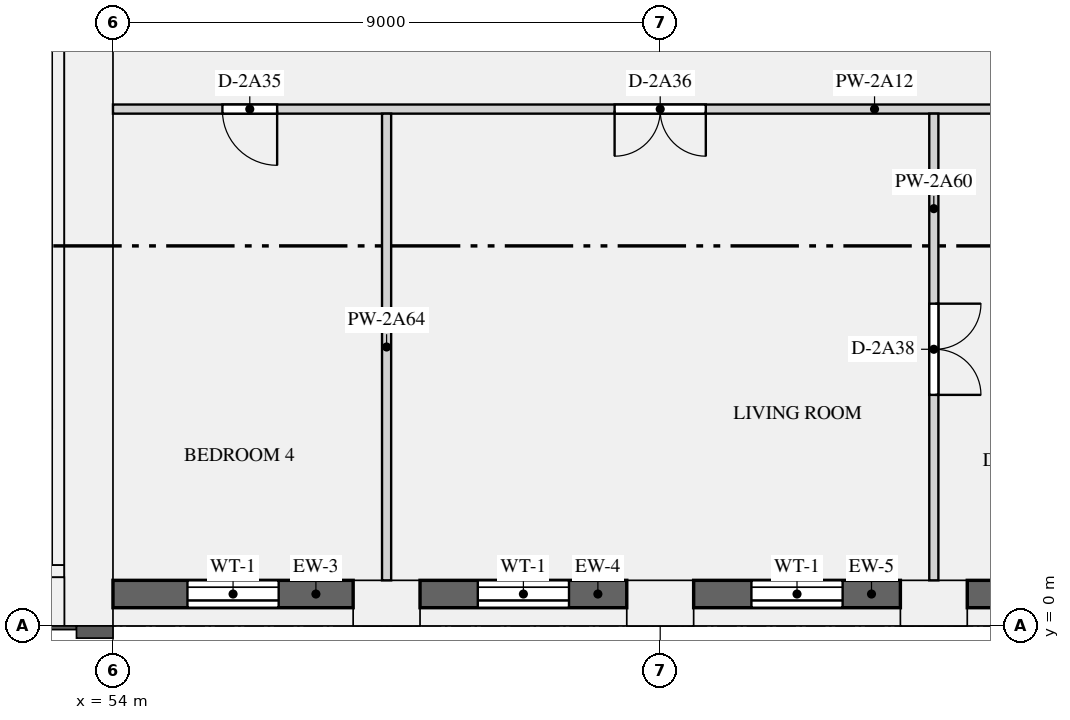
"""IFC4 building model, lengths in metres.
Left out: names, types, materials, properties, quantities, classifications, styles, units other than length and angle.
Written with IfcOpenShell. Run it as: python <this file> out.ifc"""

import sys

from ifc_helpers import new_model, si_unit, direction, frame, frame_2d, origin, origin_2d, place, context, subcontext, project, spatial, rectangle, extrude, element, fill, save


model = new_model("IFC4")
c1 = context("Model", 3, precision=1e-05, world=origin(), true_north=direction((0.0, 1.0)))
c2 = subcontext(c1, "Body", "Model", "MODEL_VIEW")
j1 = project(units=[si_unit("LENGTHUNIT", "METRE"), si_unit("PLANEANGLEUNIT", "RADIAN")], contexts=[c1])
p1 = place(None, origin())
s1 = spatial("IfcSite", under=j1, at=p1, CompositionType="ELEMENT")
p2 = place(p1, origin())
s2 = spatial("IfcBuilding", under=s1, at=p2, CompositionType="ELEMENT")
p3 = place(p2, frame((0.0, 0.0, 83.55)))
s3 = spatial("IfcBuildingStorey", under=s2, at=p3, CompositionType="ELEMENT", Elevation=83.55)
for number, where, z_axis, x_axis in (
    (1, (58.5, 0.375, 0.0), (0.0, 0.0, 1.0), (1.0, 0.0, 0.0)),
    (2, (63.0, 0.375, 0.0), (0.0, 0.0, 1.0), (1.0, 0.0, 0.0)),
    (3, (67.5, 0.375, 0.0), (0.0, 0.0, 1.0), (1.0, 0.0, 0.0)),
):
    element("IfcColumn", number, at=place(p3, frame(where, z_axis=z_axis, x_axis=x_axis)), inside=s3, PredefinedType="USERDEFINED", context=c2, shape_type="SweptSolid", body=[
        extrude(rectangle(XDim=1.1, YDim=0.75, at=origin_2d()), origin(), (0.0, 0.0, 1.0), 3.15),
    ])
p4 = place(p3, frame((53.6, 0.0, 0.0), z_axis=(0.0, 0.0, 1.0), x_axis=(0.0, 1.0, 0.0)))
e4 = element("IfcWall", 4, at=p4, inside=s3, PredefinedType="SHEAR", context=c2, shape_type="SweptSolid", body=[
    extrude(rectangle(XDim=12.5, YDim=0.8, at=frame_2d((6.25, 0.0))), origin(), (0.0, 0.0, 1.0), 3.15),
])
p5 = place(p3, frame((18.8, 0.4, 0.0), z_axis=(0.0, 0.0, 1.0), x_axis=(1.0, 0.0, 0.0)))
e5 = element("IfcWall", 5, at=p5, inside=s3, PredefinedType="SHEAR", context=c2, shape_type="SweptSolid", body=[
    extrude(rectangle(XDim=34.4, YDim=0.8, at=frame_2d((17.2, 0.0))), origin(), (0.0, 0.0, 1.0), 3.15),
])
p6 = place(p3, frame((53.1, 1.0, 0.0), z_axis=(0.0, 0.0, 1.0), x_axis=(0.0, 1.0, 0.0)))
e6 = element("IfcWall", 6, at=p6, inside=s3, PredefinedType="SHEAR", context=c2, shape_type="SweptSolid", body=[
    extrude(rectangle(XDim=10.9, YDim=0.2, at=frame_2d((5.45, 0.0))), origin(), (0.0, 0.0, 1.0), 3.15),
])
p7 = place(p3, frame((18.8, 0.9, 0.0), z_axis=(0.0, 0.0, 1.0), x_axis=(1.0, 0.0, 0.0)))
e7 = element("IfcWall", 7, at=p7, inside=s3, PredefinedType="SHEAR", context=c2, shape_type="SweptSolid", body=[
    extrude(rectangle(XDim=34.4, YDim=0.2, at=frame_2d((17.2, 0.0))), origin(), (0.0, 0.0, 1.0), 3.15),
])
p8 = place(p3, frame((54.0, 0.525, 0.9), z_axis=(0.0, 0.0, 1.0), x_axis=(1.0, 0.0, 0.0)))
e8 = element("IfcWall", 8, at=p8, inside=s3, PredefinedType="SOLIDWALL", context=c2, shape_type="SweptSolid", body=[
    extrude(rectangle(XDim=3.95, YDim=0.45, at=frame_2d((1.975, 0.0))), origin(), (0.0, 0.0, 1.0), 1.93),
])
p9 = place(p8, frame((1.225, 0.0, 0.15)))
e9 = element("IfcOpeningElement", 9, at=p9, cuts=e8, PredefinedType="OPENING", context=c2, shape_type="SweptSolid", body=[
    extrude(rectangle(XDim=1.5, YDim=1.5, at=frame_2d((0.75, 0.75))), frame((0.0, 0.235, 0.0), z_axis=(0.0, -1.0, 0.0), x_axis=(1.0, 0.0, 0.0)), (0.0, 0.0, 1.0), 0.47),
])
p10 = place(p3, frame((59.05, 0.525, 0.9), z_axis=(0.0, 0.0, 1.0), x_axis=(1.0, 0.0, 0.0)))
e10 = element("IfcWall", 10, at=p10, inside=s3, PredefinedType="SOLIDWALL", context=c2, shape_type="SweptSolid", body=[
    extrude(rectangle(XDim=3.4, YDim=0.45, at=frame_2d((1.7, 0.0))), origin(), (0.0, 0.0, 1.0), 1.93),
])
p11 = place(p10, frame((0.95, 0.0, 0.15)))
e11 = element("IfcOpeningElement", 11, at=p11, cuts=e10, PredefinedType="OPENING", context=c2, shape_type="SweptSolid", body=[
    extrude(rectangle(XDim=1.5, YDim=1.5, at=frame_2d((0.75, 0.75))), frame((0.0, 0.235, 0.0), z_axis=(0.0, -1.0, 0.0), x_axis=(1.0, 0.0, 0.0)), (0.0, 0.0, 1.0), 0.47),
])
p12 = place(p3, frame((63.55, 0.525, 0.9), z_axis=(0.0, 0.0, 1.0), x_axis=(1.0, 0.0, 0.0)))
e12 = element("IfcWall", 12, at=p12, inside=s3, PredefinedType="SOLIDWALL", context=c2, shape_type="SweptSolid", body=[
    extrude(rectangle(XDim=3.4, YDim=0.45, at=frame_2d((1.7, 0.0))), origin(), (0.0, 0.0, 1.0), 1.93),
])
p13 = place(p12, frame((0.95, 0.0, 0.15)))
e13 = element("IfcOpeningElement", 13, at=p13, cuts=e12, PredefinedType="OPENING", context=c2, shape_type="SweptSolid", body=[
    extrude(rectangle(XDim=1.5, YDim=1.5, at=frame_2d((0.75, 0.75))), frame((0.0, 0.235, 0.0), z_axis=(0.0, -1.0, 0.0), x_axis=(1.0, 0.0, 0.0)), (0.0, 0.0, 1.0), 0.47),
])
p14 = place(p3, frame((68.05, 0.525, 0.9), z_axis=(0.0, 0.0, 1.0), x_axis=(1.0, 0.0, 0.0)))
e14 = element("IfcWall", 14, at=p14, inside=s3, PredefinedType="SOLIDWALL", context=c2, shape_type="SweptSolid", body=[
    extrude(rectangle(XDim=3.2, YDim=0.45, at=frame_2d((1.6, 0.0))), origin(), (0.0, 0.0, 1.0), 1.93),
])
p15 = place(p14, frame((0.85, 0.0, 0.15)))
e15 = element("IfcOpeningElement", 15, at=p15, cuts=e14, PredefinedType="OPENING", context=c2, shape_type="SweptSolid", body=[
    extrude(rectangle(XDim=1.5, YDim=1.5, at=frame_2d((0.75, 0.75))), frame((0.0, 0.235, 0.0), z_axis=(0.0, -1.0, 0.0), x_axis=(1.0, 0.0, 0.0)), (0.0, 0.0, 1.0), 0.47),
])
p16 = place(p3, frame((54.0, 8.5, 0.0), z_axis=(0.0, 0.0, 1.0), x_axis=(1.0, 0.0, 0.0)))
e16 = element("IfcWall", 16, at=p16, inside=s3, PredefinedType="PARTITIONING", context=c2, shape_type="SweptSolid", body=[
    extrude(rectangle(XDim=17.925, YDim=0.15, at=frame_2d((8.962, 0.0))), origin(), (0.0, 0.0, 1.0), 2.83),
])
p17 = place(p16, frame((1.8, 0.0, 0.0)))
e17 = element("IfcOpeningElement", 17, at=p17, cuts=e16, PredefinedType="OPENING", context=c2, shape_type="SweptSolid", body=[
    extrude(rectangle(XDim=0.9, YDim=2.1, at=frame_2d((0.45, 1.05))), frame((0.0, 0.085, 0.0), z_axis=(0.0, -1.0, 0.0), x_axis=(1.0, 0.0, 0.0)), (0.0, 0.0, 1.0), 0.17),
])
p18 = place(p16, frame((8.25, 0.0, 0.0)))
e18 = element("IfcOpeningElement", 18, at=p18, cuts=e16, PredefinedType="OPENING", context=c2, shape_type="SweptSolid", body=[
    extrude(rectangle(XDim=1.5, YDim=2.1, at=frame_2d((0.75, 1.05))), frame((0.0, 0.085, 0.0), z_axis=(0.0, -1.0, 0.0), x_axis=(1.0, 0.0, 0.0)), (0.0, 0.0, 1.0), 0.17),
])
p19 = place(p16, frame((15.3, 0.0, 0.0)))
e19 = element("IfcOpeningElement", 19, at=p19, cuts=e16, PredefinedType="OPENING", context=c2, shape_type="SweptSolid", body=[
    extrude(rectangle(XDim=0.9, YDim=2.1, at=frame_2d((0.45, 1.05))), frame((0.0, 0.085, 0.0), z_axis=(0.0, -1.0, 0.0), x_axis=(1.0, 0.0, 0.0)), (0.0, 0.0, 1.0), 0.17),
])
p20 = place(p3, frame((67.5, 0.75, 0.0), z_axis=(0.0, 0.0, 1.0), x_axis=(0.0, 1.0, 0.0)))
e20 = element("IfcWall", 20, at=p20, inside=s3, PredefinedType="PARTITIONING", context=c2, shape_type="SweptSolid", body=[
    extrude(rectangle(XDim=7.675, YDim=0.15, at=frame_2d((3.837, 0.0))), origin(), (0.0, 0.0, 1.0), 2.83),
])
p21 = place(p20, frame((3.05, 0.0, 0.0)))
e21 = element("IfcOpeningElement", 21, at=p21, cuts=e20, PredefinedType="OPENING", context=c2, shape_type="SweptSolid", body=[
    extrude(rectangle(XDim=1.5, YDim=2.1, at=frame_2d((0.75, 1.05))), frame((0.0, 0.085, 0.0), z_axis=(0.0, -1.0, 0.0), x_axis=(1.0, 0.0, 0.0)), (0.0, 0.0, 1.0), 0.17),
])
p22 = place(p3, frame((58.5, 0.75, 0.0), z_axis=(0.0, 0.0, 1.0), x_axis=(0.0, 1.0, 0.0)))
e22 = element("IfcWall", 22, at=p22, inside=s3, PredefinedType="PARTITIONING", context=c2, shape_type="SweptSolid", body=[
    extrude(rectangle(XDim=7.675, YDim=0.15, at=frame_2d((3.837, 0.0))), origin(), (0.0, 0.0, 1.0), 2.83),
])
p23 = place(p9, origin())
e23 = element("IfcWindow", 23, at=p23, inside=s3, PartitioningType="SINGLE_PANEL", PredefinedType="WINDOW", context=c2, shape_type="SweptSolid", body=[
    extrude(rectangle(XDim=1.5, YDim=1.5, at=frame_2d((0.75, 0.75))), frame((0.0, -0.065, 0.0), z_axis=(0.0, -1.0, 0.0), x_axis=(1.0, 0.0, 0.0)), (0.0, 0.0, 1.0), 0.06),
])
fill(e9, e23)
p24 = place(p11, origin())
e24 = element("IfcWindow", 24, at=p24, inside=s3, PartitioningType="SINGLE_PANEL", PredefinedType="WINDOW", context=c2, shape_type="SweptSolid", body=[
    extrude(rectangle(XDim=1.5, YDim=1.5, at=frame_2d((0.75, 0.75))), frame((0.0, -0.065, 0.0), z_axis=(0.0, -1.0, 0.0), x_axis=(1.0, 0.0, 0.0)), (0.0, 0.0, 1.0), 0.06),
])
fill(e11, e24)
p25 = place(p13, origin())
e25 = element("IfcWindow", 25, at=p25, inside=s3, PartitioningType="SINGLE_PANEL", PredefinedType="WINDOW", context=c2, shape_type="SweptSolid", body=[
    extrude(rectangle(XDim=1.5, YDim=1.5, at=frame_2d((0.75, 0.75))), frame((0.0, -0.065, 0.0), z_axis=(0.0, -1.0, 0.0), x_axis=(1.0, 0.0, 0.0)), (0.0, 0.0, 1.0), 0.06),
])
fill(e13, e25)
p26 = place(p17, frame((0.9, 0.0, 0.0), z_axis=(0.0, 0.0, 1.0), x_axis=(-1.0, 0.0, 0.0)))
e26 = element("IfcDoor", 26, at=p26, inside=s3, OperationType="SINGLE_SWING_LEFT", PredefinedType="DOOR", context=c2, shape_type="SweptSolid", body=[
    extrude(rectangle(XDim=0.9, YDim=2.1, at=frame_2d((0.45, 1.05))), frame((0.0, 0.025, 0.0), z_axis=(0.0, -1.0, 0.0), x_axis=(1.0, 0.0, 0.0)), (0.0, 0.0, 1.0), 0.05),
])
fill(e17, e26)
p27 = place(p18, frame((1.5, 0.0, 0.0), z_axis=(0.0, 0.0, 1.0), x_axis=(-1.0, 0.0, 0.0)))
e27 = element("IfcDoor", 27, at=p27, inside=s3, OperationType="DOUBLE_DOOR_SINGLE_SWING", PredefinedType="DOOR", context=c2, shape_type="SweptSolid", body=[
    extrude(rectangle(XDim=1.5, YDim=2.1, at=frame_2d((0.75, 1.05))), frame((0.0, 0.025, 0.0), z_axis=(0.0, -1.0, 0.0), x_axis=(1.0, 0.0, 0.0)), (0.0, 0.0, 1.0), 0.05),
])
fill(e18, e27)
p28 = place(p21, frame((1.5, 0.0, 0.0), z_axis=(0.0, 0.0, 1.0), x_axis=(-1.0, 0.0, 0.0)))
e28 = element("IfcDoor", 28, at=p28, inside=s3, OperationType="DOUBLE_DOOR_SINGLE_SWING", PredefinedType="DOOR", context=c2, shape_type="SweptSolid", body=[
    extrude(rectangle(XDim=1.5, YDim=2.1, at=frame_2d((0.75, 1.05))), frame((0.0, 0.025, 0.0), z_axis=(0.0, -1.0, 0.0), x_axis=(1.0, 0.0, 0.0)), (0.0, 0.0, 1.0), 0.05),
])
fill(e21, e28)
save(model, sys.argv[1])
